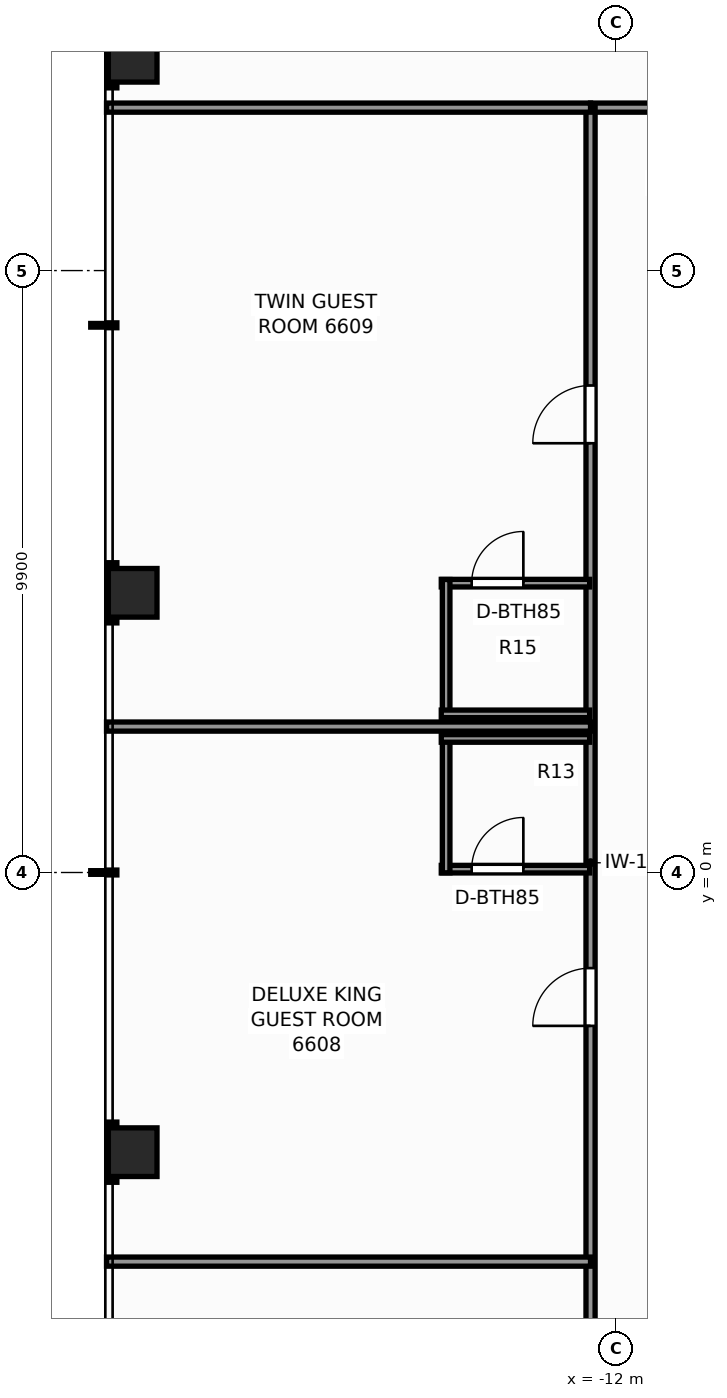
"""IFC4 building model, lengths in metres.
Left out: names, types, materials, properties, quantities, classifications, styles, units other than length and angle.
Written with IfcOpenShell. Run it as: python <this file> out.ifc"""

import sys

from ifc_helpers import new_model, si_unit, direction, frame, frame_2d, origin, origin_2d, place, context, subcontext, project, spatial, rectangle, extrude, element, fill, save


model = new_model("IFC4")
c1 = context("Model", 3, precision=1e-05, world=origin(), true_north=direction((0.0, 1.0)))
c2 = subcontext(c1, "Body", "Model", "MODEL_VIEW")
j1 = project(units=[si_unit("LENGTHUNIT", "METRE"), si_unit("PLANEANGLEUNIT", "RADIAN")], contexts=[c1])
p1 = place(None, origin())
s1 = spatial("IfcSite", under=j1, at=p1, CompositionType="ELEMENT")
p2 = place(p1, origin())
s2 = spatial("IfcBuilding", under=s1, at=p2, CompositionType="ELEMENT")
p3 = place(p2, frame((0.0, 0.0, 226.2)))
s3 = spatial("IfcBuildingStorey", under=s2, at=p3, CompositionType="ELEMENT", Elevation=226.2)
for number, where, z_axis, x_axis in (
    (1, (-19.95, -4.6, 0.0), (0.0, 0.0, 1.0), (1.0, 0.0, 0.0)),
    (2, (-19.95, 4.6, 0.0), (0.0, 0.0, 1.0), (1.0, 0.0, 0.0)),
    (3, (-19.95, 13.4, 0.0), (0.0, 0.0, 1.0), (1.0, 0.0, 0.0)),
):
    element("IfcColumn", number, at=place(p3, frame(where, z_axis=z_axis, x_axis=x_axis)), inside=s3, PredefinedType="COLUMN", context=c2, shape_type="SweptSolid", body=[
        extrude(rectangle(XDim=0.8, YDim=0.8, at=origin_2d()), origin(), (0.0, 0.0, 1.0), 3.3),
    ])
p4 = place(p3, frame((-12.42, 12.58, 0.0), z_axis=(0.0, 0.0, 1.0), x_axis=(1.0, 0.0, 0.0)))
e4 = element("IfcWall", 4, at=p4, inside=s3, PredefinedType="PARTITIONING", context=c2, shape_type="SweptSolid", body=[
    extrude(rectangle(XDim=24.68, YDim=0.15, at=frame_2d((12.34, 0.0))), origin(), (0.0, 0.0, 1.0), 2.369),
])
p5 = place(p4, frame((3.267, 0.0, 0.0)))
e5 = element("IfcOpeningElement", 5, at=p5, cuts=e4, PredefinedType="OPENING", context=c2, shape_type="SweptSolid", body=[
    extrude(rectangle(XDim=0.9, YDim=2.06, at=frame_2d((0.45, 1.03))), frame((0.0, 0.085, 0.0), z_axis=(0.0, -1.0, 0.0), x_axis=(1.0, 0.0, 0.0)), (0.0, 0.0, 1.0), 0.17),
])
p6 = place(p4, frame((9.915, 0.0, 0.0)))
e6 = element("IfcOpeningElement", 6, at=p6, cuts=e4, PredefinedType="OPENING", context=c2, shape_type="SweptSolid", body=[
    extrude(rectangle(XDim=0.95, YDim=2.06, at=frame_2d((0.475, 1.03))), frame((0.0, 0.085, 0.0), z_axis=(0.0, -1.0, 0.0), x_axis=(1.0, 0.0, 0.0)), (0.0, 0.0, 1.0), 0.17),
])
p7 = place(p4, frame((18.587, 0.0, 0.0)))
e7 = element("IfcOpeningElement", 7, at=p7, cuts=e4, PredefinedType="OPENING", context=c2, shape_type="SweptSolid", body=[
    extrude(rectangle(XDim=0.95, YDim=2.06, at=frame_2d((0.475, 1.03))), frame((0.0, 0.085, 0.0), z_axis=(0.0, -1.0, 0.0), x_axis=(1.0, 0.0, 0.0)), (0.0, 0.0, 1.0), 0.17),
])
p8 = place(p4, frame((20.85, 0.0, 0.0)))
e8 = element("IfcOpeningElement", 8, at=p8, cuts=e4, PredefinedType="OPENING", context=c2, shape_type="SweptSolid", body=[
    extrude(rectangle(XDim=0.9, YDim=2.06, at=frame_2d((0.45, 1.03))), frame((0.0, 0.085, 0.0), z_axis=(0.0, -1.0, 0.0), x_axis=(1.0, 0.0, 0.0)), (0.0, 0.0, 1.0), 0.17),
])
p9 = place(p3, frame((-12.42, -12.26, 0.0), z_axis=(0.0, 0.0, 1.0), x_axis=(0.0, 1.0, 0.0)))
e9 = element("IfcWall", 9, at=p9, inside=s3, PredefinedType="PARTITIONING", context=c2, shape_type="SweptSolid", body=[
    extrude(rectangle(XDim=24.84, YDim=0.15, at=frame_2d((12.42, 0.0))), origin(), (0.0, 0.0, 1.0), 2.369),
])
p10 = place(p9, frame((3.84, 0.0, 0.0)))
e10 = element("IfcOpeningElement", 10, at=p10, cuts=e9, PredefinedType="OPENING", context=c2, shape_type="SweptSolid", body=[
    extrude(rectangle(XDim=0.95, YDim=2.06, at=frame_2d((0.475, 1.03))), frame((0.0, 0.085, 0.0), z_axis=(0.0, -1.0, 0.0), x_axis=(1.0, 0.0, 0.0)), (0.0, 0.0, 1.0), 0.17),
])
p11 = place(p9, frame((9.738, 0.0, 0.0)))
e11 = element("IfcOpeningElement", 11, at=p11, cuts=e9, PredefinedType="OPENING", context=c2, shape_type="SweptSolid", body=[
    extrude(rectangle(XDim=0.95, YDim=2.06, at=frame_2d((0.475, 1.03))), frame((0.0, 0.085, 0.0), z_axis=(0.0, -1.0, 0.0), x_axis=(1.0, 0.0, 0.0)), (0.0, 0.0, 1.0), 0.17),
])
p12 = place(p9, frame((19.32, 0.0, 0.0)))
e12 = element("IfcOpeningElement", 12, at=p12, cuts=e9, PredefinedType="OPENING", context=c2, shape_type="SweptSolid", body=[
    extrude(rectangle(XDim=0.95, YDim=2.06, at=frame_2d((0.475, 1.03))), frame((0.0, 0.085, 0.0), z_axis=(0.0, -1.0, 0.0), x_axis=(1.0, 0.0, 0.0)), (0.0, 0.0, 1.0), 0.17),
])
p13 = place(p3, frame((-20.38, 12.58, 0.0), z_axis=(0.0, 0.0, 1.0), x_axis=(1.0, 0.0, 0.0)))
e13 = element("IfcWall", 13, at=p13, inside=s3, PredefinedType="PARTITIONING", context=c2, shape_type="SweptSolid", body=[
    extrude(rectangle(XDim=7.96, YDim=0.15, at=frame_2d((3.98, 0.0))), origin(), (0.0, 0.0, 1.0), 2.369),
])
for number, where, z_axis, x_axis in (
    (14, (-20.38, -6.4, 0.0), (0.0, 0.0, 1.0), (1.0, 0.0, 0.0)),
    (15, (-20.38, 2.4, 0.0), (0.0, 0.0, 1.0), (1.0, 0.0, 0.0)),
):
    element("IfcWall", number, at=place(p3, frame(where, z_axis=z_axis, x_axis=x_axis)), inside=s3, PredefinedType="PARTITIONING", context=c2, shape_type="SweptSolid", body=[
        extrude(rectangle(XDim=7.96, YDim=0.15, at=frame_2d((3.98, 0.0))), origin(), (0.0, 0.0, 1.0), 2.453),
    ])
p14 = place(p3, frame((-14.875, 0.055, 0.0), z_axis=(0.0, 0.0, 1.0), x_axis=(1.0, 0.0, 0.0)))
e16 = element("IfcWall", 16, at=p14, inside=s3, PredefinedType="PARTITIONING", context=c2, shape_type="SweptSolid", body=[
    extrude(rectangle(XDim=2.44, YDim=0.125, at=frame_2d((1.22, 0.0))), origin(), (0.0, 0.0, 1.0), 2.605),
])
p15 = place(p14, frame((0.5, 0.0, 0.0)))
e17 = element("IfcOpeningElement", 17, at=p15, cuts=e16, PredefinedType="OPENING", context=c2, shape_type="SweptSolid", body=[
    extrude(rectangle(XDim=0.85, YDim=2.03, at=frame_2d((0.425, 1.015))), frame((0.0, 0.073, 0.0), z_axis=(0.0, -1.0, 0.0), x_axis=(1.0, 0.0, 0.0)), (0.0, 0.0, 1.0), 0.145),
])
p16 = place(p3, frame((-14.795, -0.005, 0.0), z_axis=(0.0, 0.0, 1.0), x_axis=(0.0, 1.0, 0.0)))
e18 = element("IfcWall", 18, at=p16, inside=s3, PredefinedType="PARTITIONING", context=c2, shape_type="SweptSolid", body=[
    extrude(rectangle(XDim=2.27, YDim=0.125, at=frame_2d((1.135, 0.0))), origin(), (0.0, 0.0, 1.0), 2.605),
])
p17 = place(p3, frame((-14.875, 2.205, 0.0), z_axis=(0.0, 0.0, 1.0), x_axis=(1.0, 0.0, 0.0)))
e19 = element("IfcWall", 19, at=p17, inside=s3, PredefinedType="PARTITIONING", context=c2, shape_type="SweptSolid", body=[
    extrude(rectangle(XDim=2.44, YDim=0.125, at=frame_2d((1.22, 0.0))), origin(), (0.0, 0.0, 1.0), 3.08),
])
p18 = place(p3, frame((-14.875, 4.759, 0.0), z_axis=(0.0, 0.0, 1.0), x_axis=(1.0, 0.0, 0.0)))
e20 = element("IfcWall", 20, at=p18, inside=s3, PredefinedType="PARTITIONING", context=c2, shape_type="SweptSolid", body=[
    extrude(rectangle(XDim=2.44, YDim=0.125, at=frame_2d((1.22, 0.0))), origin(), (0.0, 0.0, 1.0), 2.369),
])
p19 = place(p18, frame((0.5, 0.0, 0.0)))
e21 = element("IfcOpeningElement", 21, at=p19, cuts=e20, PredefinedType="OPENING", context=c2, shape_type="SweptSolid", body=[
    extrude(rectangle(XDim=0.85, YDim=2.03, at=frame_2d((0.425, 1.015))), frame((0.0, 0.073, 0.0), z_axis=(0.0, -1.0, 0.0), x_axis=(1.0, 0.0, 0.0)), (0.0, 0.0, 1.0), 0.145),
])
p20 = place(p3, frame((-14.795, 2.549, 0.0), z_axis=(0.0, 0.0, 1.0), x_axis=(0.0, 1.0, 0.0)))
e22 = element("IfcWall", 22, at=p20, inside=s3, PredefinedType="PARTITIONING", context=c2, shape_type="SweptSolid", body=[
    extrude(rectangle(XDim=2.27, YDim=0.125, at=frame_2d((1.135, 0.0))), origin(), (0.0, 0.0, 1.0), 2.369),
])
p21 = place(p3, frame((-14.875, 2.609, 0.0), z_axis=(0.0, 0.0, 1.0), x_axis=(1.0, 0.0, 0.0)))
e23 = element("IfcWall", 23, at=p21, inside=s3, PredefinedType="PARTITIONING", context=c2, shape_type="SweptSolid", body=[
    extrude(rectangle(XDim=2.44, YDim=0.125, at=frame_2d((1.22, 0.0))), origin(), (0.0, 0.0, 1.0), 3.08),
])
p22 = place(p15, origin())
e24 = element("IfcDoor", 24, at=p22, inside=s3, OperationType="SINGLE_SWING_RIGHT", PredefinedType="DOOR", context=c2, shape_type="SweptSolid", body=[
    extrude(rectangle(XDim=0.85, YDim=2.03, at=frame_2d((0.425, 1.015))), frame((0.0, 0.025, 0.0), z_axis=(0.0, -1.0, 0.0), x_axis=(1.0, 0.0, 0.0)), (0.0, 0.0, 1.0), 0.05),
])
fill(e17, e24)
p23 = place(p11, origin())
e25 = element("IfcDoor", 25, at=p23, inside=s3, OperationType="SINGLE_SWING_LEFT", PredefinedType="DOOR", context=c2, shape_type="SweptSolid", body=[
    extrude(rectangle(XDim=0.95, YDim=2.06, at=frame_2d((0.475, 1.03))), frame((0.0, 0.025, 0.0), z_axis=(0.0, -1.0, 0.0), x_axis=(1.0, 0.0, 0.0)), (0.0, 0.0, 1.0), 0.05),
])
fill(e11, e25)
p24 = place(p19, origin())
e26 = element("IfcDoor", 26, at=p24, inside=s3, OperationType="SINGLE_SWING_RIGHT", PredefinedType="DOOR", context=c2, shape_type="SweptSolid", body=[
    extrude(rectangle(XDim=0.85, YDim=2.03, at=frame_2d((0.425, 1.015))), frame((0.0, 0.025, 0.0), z_axis=(0.0, -1.0, 0.0), x_axis=(1.0, 0.0, 0.0)), (0.0, 0.0, 1.0), 0.05),
])
fill(e21, e26)
p25 = place(p12, origin())
e27 = element("IfcDoor", 27, at=p25, inside=s3, OperationType="SINGLE_SWING_LEFT", PredefinedType="DOOR", context=c2, shape_type="SweptSolid", body=[
    extrude(rectangle(XDim=0.95, YDim=2.06, at=frame_2d((0.475, 1.03))), frame((0.0, 0.025, 0.0), z_axis=(0.0, -1.0, 0.0), x_axis=(1.0, 0.0, 0.0)), (0.0, 0.0, 1.0), 0.05),
])
fill(e12, e27)
save(model, sys.argv[1])
